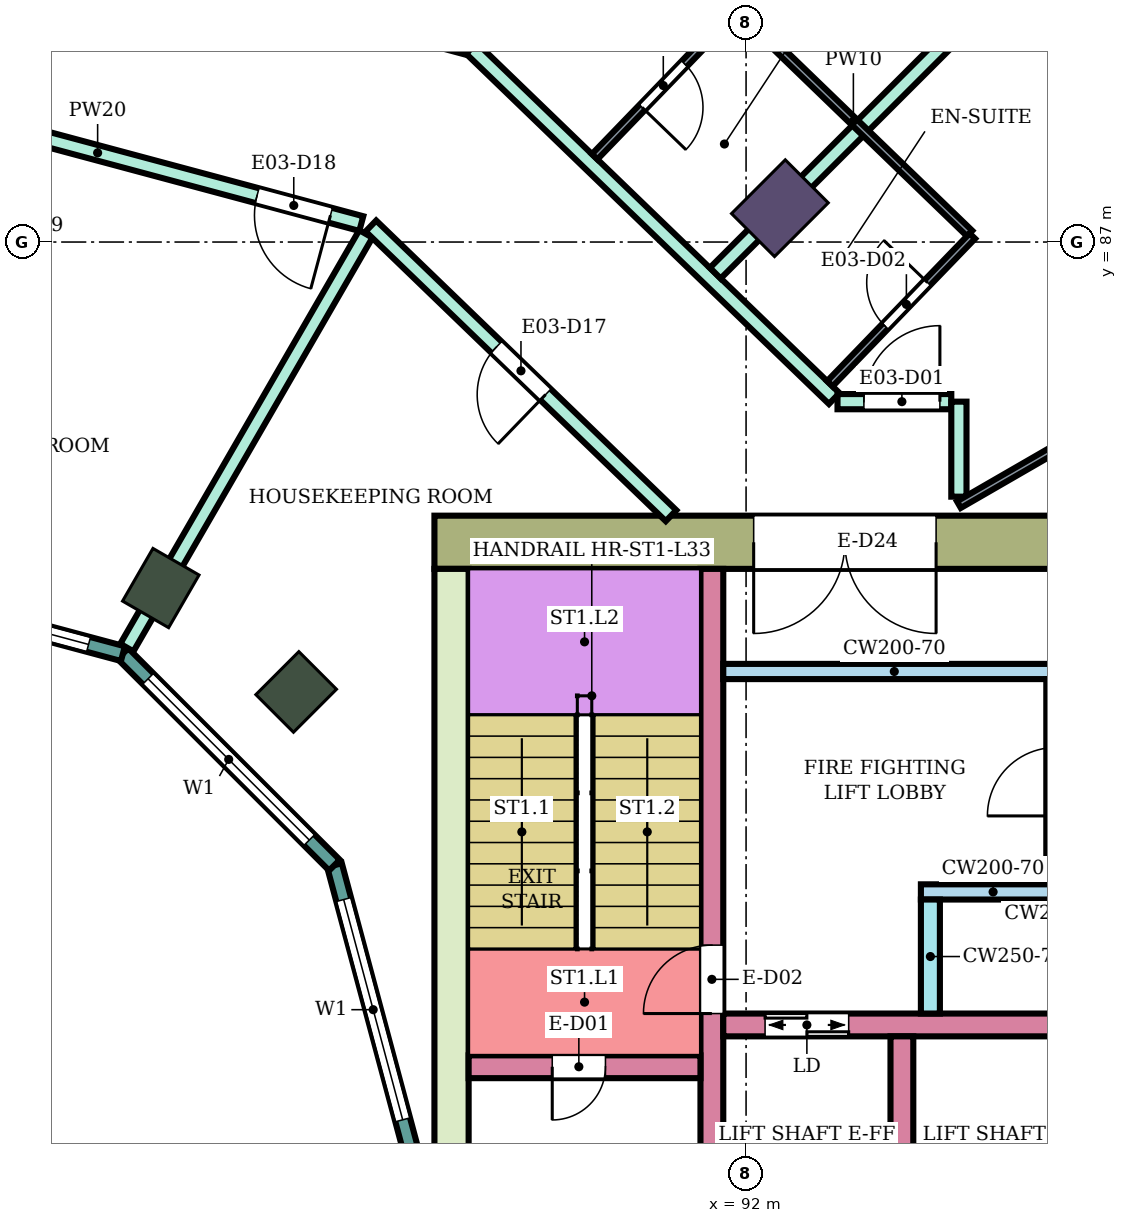
"""IFC4 building model, lengths in metres.
Left out: names, types, materials, properties, quantities, classifications, styles, units other than length and angle.
Written with IfcOpenShell. Run it as: python <this file> out.ifc"""

import sys

from ifc_helpers import new_model, si_unit, direction, frame, frame_2d, origin, origin_2d, place, context, subcontext, project, spatial, rectangle, extrude, element, fill, save


model = new_model("IFC4")
c1 = context("Model", 3, precision=1e-05, world=origin(), true_north=direction((0.0, 1.0)))
c2 = subcontext(c1, "Body", "Model", "MODEL_VIEW")
j1 = project(units=[si_unit("LENGTHUNIT", "METRE"), si_unit("PLANEANGLEUNIT", "RADIAN")], contexts=[c1])
p1 = place(None, origin())
s1 = spatial("IfcSite", under=j1, at=p1, CompositionType="ELEMENT")
p2 = place(p1, origin())
s2 = spatial("IfcBuilding", under=s1, at=p2, CompositionType="ELEMENT")
p3 = place(p2, frame((0.0, 0.0, 141.9)))
s3 = spatial("IfcBuildingStorey", under=s2, at=p3, CompositionType="ELEMENT", Elevation=141.9)
p4 = place(p3, frame((92.445, 87.445, 0.0), z_axis=(0.0, 0.0, 1.0), x_axis=(0.707106781187, 0.707106781187, 0.0)))
e1 = element("IfcColumn", 1, at=p4, inside=s3, PredefinedType="COLUMN", context=c2, shape_type="SweptSolid", body=[
    extrude(rectangle(XDim=1.0, YDim=0.8, at=origin_2d()), origin(), (0.0, 0.0, 1.0), 3.9),
])
for number, where, z_axis, x_axis in (
    (2, (86.081, 81.081, 0.0), (0.0, 0.0, 1.0), (0.707, 0.707, 0.0)),
    (3, (84.3, 82.448, 0.0), (0.0, 0.0, 1.0), (0.5, 0.866, 0.0)),
):
    element("IfcColumn", number, at=place(p3, frame(where, z_axis=z_axis, x_axis=x_axis)), inside=s3, PredefinedType="COLUMN", context=c2, shape_type="SweptSolid", body=[
        extrude(rectangle(XDim=0.8, YDim=0.7, at=origin_2d()), origin(), (0.0, 0.0, 1.0), 3.9),
    ])
p5 = place(p3, frame((95.91, 90.91, 0.0), z_axis=(0.0, 0.0, 1.0), x_axis=(0.707106781187, 0.707106781187, 0.0)))
e4 = element("IfcColumn", 4, at=p5, inside=s3, PredefinedType="COLUMN", context=c2, shape_type="SweptSolid", body=[
    extrude(rectangle(XDim=1.8, YDim=2.4, at=origin_2d()), origin(), (0.0, 0.0, 1.0), 3.9),
])
p6 = place(p3, frame((87.9, 83.05, 0.0), z_axis=(0.0, 0.0, 1.0), x_axis=(1.0, 0.0, 0.0)))
e5 = element("IfcWall", 5, at=p6, inside=s3, PredefinedType="SHEAR", context=c2, shape_type="SweptSolid", body=[
    extrude(rectangle(XDim=14.8, YDim=0.7, at=frame_2d((7.4, 0.0))), origin(), (0.0, 0.0, 1.0), 3.58),
])
p7 = place(p6, frame((4.2, 0.0, 0.0)))
e6 = element("IfcOpeningElement", 6, at=p7, cuts=e5, PredefinedType="OPENING", context=c2, shape_type="SweptSolid", body=[
    extrude(rectangle(XDim=2.4, YDim=2.4, at=frame_2d((1.2, 1.2))), frame((0.0, 0.36, 0.0), z_axis=(0.0, -1.0, 0.0), x_axis=(1.0, 0.0, 0.0)), (0.0, 0.0, 1.0), 0.72),
])
p8 = place(p3, frame((88.125, 75.0, 0.0), z_axis=(0.0, 0.0, 1.0), x_axis=(0.0, 1.0, 0.0)))
e7 = element("IfcWall", 7, at=p8, inside=s3, PredefinedType="SHEAR", context=c2, shape_type="SweptSolid", body=[
    extrude(rectangle(XDim=7.7, YDim=0.45, at=frame_2d((3.85, 0.0))), origin(), (0.0, 0.0, 1.0), 3.58),
])
p9 = place(p3, frame((91.55, 75.0, 0.0), z_axis=(0.0, 0.0, 1.0), x_axis=(0.0, 1.0, 0.0)))
e8 = element("IfcWall", 8, at=p9, inside=s3, PredefinedType="SHEAR", context=c2, shape_type="SweptSolid", body=[
    extrude(rectangle(XDim=7.7, YDim=0.3, at=frame_2d((3.85, 0.0))), origin(), (0.0, 0.0, 1.0), 3.58),
])
p10 = place(p9, frame((1.85, 0.0, 0.0)))
e9 = element("IfcOpeningElement", 9, at=p10, cuts=e8, PredefinedType="OPENING", context=c2, shape_type="SweptSolid", body=[
    extrude(rectangle(XDim=0.9, YDim=2.1, at=frame_2d((0.45, 1.05))), frame((0.0, 0.16, 0.0), z_axis=(0.0, -1.0, 0.0), x_axis=(1.0, 0.0, 0.0)), (0.0, 0.0, 1.0), 0.32),
])
p11 = place(p3, frame((88.35, 76.15, 0.0), z_axis=(0.0, 0.0, 1.0), x_axis=(1.0, 0.0, 0.0)))
e10 = element("IfcWall", 10, at=p11, inside=s3, PredefinedType="SHEAR", context=c2, shape_type="SweptSolid", body=[
    extrude(rectangle(XDim=3.05, YDim=0.3, at=frame_2d((1.525, 0.0))), origin(), (0.0, 0.0, 1.0), 3.58),
])
p12 = place(p11, frame((1.1, 0.0, 0.0)))
e11 = element("IfcOpeningElement", 11, at=p12, cuts=e10, PredefinedType="OPENING", context=c2, shape_type="SweptSolid", body=[
    extrude(rectangle(XDim=0.7, YDim=2.0, at=frame_2d((0.35, 1.0))), frame((0.0, 0.16, 0.0), z_axis=(0.0, -1.0, 0.0), x_axis=(1.0, 0.0, 0.0)), (0.0, 0.0, 1.0), 0.32),
])
p13 = place(p3, frame((91.7, 76.7, 0.0), z_axis=(0.0, 0.0, 1.0), x_axis=(1.0, 0.0, 0.0)))
e12 = element("IfcWall", 12, at=p13, inside=s3, PredefinedType="SHEAR", context=c2, shape_type="SweptSolid", body=[
    extrude(rectangle(XDim=11.0, YDim=0.3, at=frame_2d((5.5, 0.0))), origin(), (0.0, 0.0, 1.0), 3.58),
])
p14 = place(p13, frame((0.55, 0.0, 0.0)))
e13 = element("IfcOpeningElement", 13, at=p14, cuts=e12, PredefinedType="OPENING", context=c2, shape_type="SweptSolid", body=[
    extrude(rectangle(XDim=1.1, YDim=2.1, at=frame_2d((0.55, 1.05))), frame((0.0, 0.16, 0.0), z_axis=(0.0, -1.0, 0.0), x_axis=(1.0, 0.0, 0.0)), (0.0, 0.0, 1.0), 0.32),
])
p15 = place(p13, frame((8.1, 0.0, 0.0)))
e14 = element("IfcOpeningElement", 14, at=p15, cuts=e12, PredefinedType="OPENING", context=c2, shape_type="SweptSolid", body=[
    extrude(rectangle(XDim=1.0, YDim=2.1, at=frame_2d((0.5, 1.05))), frame((0.0, 0.16, 0.0), z_axis=(0.0, -1.0, 0.0), x_axis=(1.0, 0.0, 0.0)), (0.0, 0.0, 1.0), 0.32),
])
p16 = place(p3, frame((94.05, 74.0, 0.0), z_axis=(0.0, 0.0, 1.0), x_axis=(0.0, 1.0, 0.0)))
e15 = element("IfcWall", 15, at=p16, inside=s3, PredefinedType="SHEAR", context=c2, shape_type="SweptSolid", body=[
    extrude(rectangle(XDim=2.55, YDim=0.3, at=frame_2d((1.275, 0.0))), origin(), (0.0, 0.0, 1.0), 3.58),
])
p17 = place(p3, frame((91.7, 81.35, 0.0), z_axis=(0.0, 0.0, 1.0), x_axis=(1.0, 0.0, 0.0)))
e16 = element("IfcWall", 16, at=p17, inside=s3, PredefinedType="SHEAR", context=c2, shape_type="SweptSolid", body=[
    extrude(rectangle(XDim=4.5, YDim=0.2, at=frame_2d((2.25, 0.0))), origin(), (0.0, 0.0, 1.0), 3.58),
])
p18 = place(p3, frame((96.075, 78.55, 0.0), z_axis=(0.0, 0.0, 1.0), x_axis=(0.0, 1.0, 0.0)))
e17 = element("IfcWall", 17, at=p18, inside=s3, PredefinedType="SHEAR", context=c2, shape_type="SweptSolid", body=[
    extrude(rectangle(XDim=2.7, YDim=0.25, at=frame_2d((1.35, 0.0))), origin(), (0.0, 0.0, 1.0), 3.58),
])
p19 = place(p18, frame((0.9, 0.0, 0.0)))
e18 = element("IfcOpeningElement", 18, at=p19, cuts=e17, PredefinedType="OPENING", context=c2, shape_type="SweptSolid", body=[
    extrude(rectangle(XDim=0.9, YDim=2.1, at=frame_2d((0.45, 1.05))), frame((0.0, 0.135, 0.0), z_axis=(0.0, -1.0, 0.0), x_axis=(1.0, 0.0, 0.0)), (0.0, 0.0, 1.0), 0.27),
])
p20 = place(p3, frame((94.3, 78.45, 0.0), z_axis=(0.0, 0.0, 1.0), x_axis=(1.0, 0.0, 0.0)))
e19 = element("IfcWall", 19, at=p20, inside=s3, PredefinedType="SHEAR", context=c2, shape_type="SweptSolid", body=[
    extrude(rectangle(XDim=1.9, YDim=0.2, at=frame_2d((0.95, 0.0))), origin(), (0.0, 0.0, 1.0), 3.58),
])
p21 = place(p3, frame((94.425, 76.85, 0.0), z_axis=(0.0, 0.0, 1.0), x_axis=(0.0, 1.0, 0.0)))
e20 = element("IfcWall", 20, at=p21, inside=s3, PredefinedType="SHEAR", context=c2, shape_type="SweptSolid", body=[
    extrude(rectangle(XDim=1.5, YDim=0.25, at=frame_2d((0.75, 0.0))), origin(), (0.0, 0.0, 1.0), 3.58),
])
p22 = place(p3, frame((87.604, 75.0, 0.0), z_axis=(0.0, 0.0, 1.0), x_axis=(-0.258789828301, 0.965933654434, 0.0)))
e21 = element("IfcWall", 21, at=p22, inside=s3, PredefinedType="NOTDEFINED", context=c2, shape_type="SweptSolid", body=[
    extrude(rectangle(XDim=3.936, YDim=0.2, at=frame_2d((1.968, 0.0))), origin(), (0.0, 0.0, 1.0), 3.9),
])
p23 = place(p22, frame((0.468, 0.0, 0.9)))
e22 = element("IfcOpeningElement", 22, at=p23, cuts=e21, PredefinedType="OPENING", context=c2, shape_type="SweptSolid", body=[
    extrude(rectangle(XDim=3.0, YDim=2.3, at=frame_2d((1.5, 1.15))), frame((0.0, 0.11, 0.0), z_axis=(0.0, -1.0, 0.0), x_axis=(1.0, 0.0, 0.0)), (0.0, 0.0, 1.0), 0.22),
])
p24 = place(p3, frame((86.585, 78.802, 0.0), z_axis=(0.0, 0.0, 1.0), x_axis=(-0.707106781187, 0.707106781187, 0.0)))
e23 = element("IfcWall", 23, at=p24, inside=s3, PredefinedType="NOTDEFINED", context=c2, shape_type="SweptSolid", body=[
    extrude(rectangle(XDim=3.936, YDim=0.2, at=frame_2d((1.968, 0.0))), origin(), (0.0, 0.0, 1.0), 3.9),
])
p25 = place(p24, frame((0.468, 0.0, 0.9)))
e24 = element("IfcOpeningElement", 24, at=p25, cuts=e23, PredefinedType="OPENING", context=c2, shape_type="SweptSolid", body=[
    extrude(rectangle(XDim=3.0, YDim=2.3, at=frame_2d((1.5, 1.15))), frame((0.0, 0.11, 0.0), z_axis=(0.0, -1.0, 0.0), x_axis=(1.0, 0.0, 0.0)), (0.0, 0.0, 1.0), 0.22),
])
p26 = place(p3, frame((83.802, 81.585, 0.0), z_axis=(0.0, 0.0, 1.0), x_axis=(-0.965933654434, 0.258789828301, 0.0)))
e25 = element("IfcWall", 25, at=p26, inside=s3, PredefinedType="NOTDEFINED", context=c2, shape_type="SweptSolid", body=[
    extrude(rectangle(XDim=3.936, YDim=0.2, at=frame_2d((1.968, 0.0))), origin(), (0.0, 0.0, 1.0), 3.9),
])
p27 = place(p26, frame((0.468, 0.0, 0.9)))
e26 = element("IfcOpeningElement", 26, at=p27, cuts=e25, PredefinedType="OPENING", context=c2, shape_type="SweptSolid", body=[
    extrude(rectangle(XDim=3.0, YDim=2.3, at=frame_2d((1.5, 1.15))), frame((0.0, 0.11, 0.0), z_axis=(0.0, -1.0, 0.0), x_axis=(1.0, 0.0, 0.0)), (0.0, 0.0, 1.0), 0.22),
])
p28 = place(p3, frame((80.0, 89.104, 0.0), z_axis=(0.0, 0.0, 1.0), x_axis=(0.965854247166, -0.25908603442, 0.0)))
e27 = element("IfcWall", 27, at=p28, inside=s3, PredefinedType="PARTITIONING", context=c2, shape_type="SweptSolid", body=[
    extrude(rectangle(XDim=7.183, YDim=0.2, at=frame_2d((3.592, 0.0))), origin(), (0.0, 0.0, 1.0), 3.45),
])
p29 = place(p28, frame((5.763, 0.0, 0.0)))
e28 = element("IfcOpeningElement", 28, at=p29, cuts=e27, PredefinedType="OPENING", context=c2, shape_type="SweptSolid", body=[
    extrude(rectangle(XDim=1.0, YDim=2.1, at=frame_2d((0.5, 1.05))), frame((0.0, 0.11, 0.0), z_axis=(0.0, -1.0, 0.0), x_axis=(1.0, 0.0, 0.0)), (0.0, 0.0, 1.0), 0.22),
])
p30 = place(p3, frame((80.0, 91.796, 0.0), z_axis=(0.0, 0.0, 1.0), x_axis=(0.965891796243, -0.258946013582, 0.0)))
e29 = element("IfcWall", 29, at=p30, inside=s3, PredefinedType="PARTITIONING", context=c2, shape_type="SweptSolid", body=[
    extrude(rectangle(XDim=8.642, YDim=0.2, at=frame_2d((4.321, 0.0))), origin(), (0.0, 0.0, 1.0), 3.45),
])
p31 = place(p30, frame((4.877, 0.0, 0.0)))
e30 = element("IfcOpeningElement", 30, at=p31, cuts=e29, PredefinedType="OPENING", context=c2, shape_type="SweptSolid", body=[
    extrude(rectangle(XDim=1.0, YDim=2.1, at=frame_2d((0.5, 1.05))), frame((0.0, 0.11, 0.0), z_axis=(0.0, -1.0, 0.0), x_axis=(1.0, 0.0, 0.0)), (0.0, 0.0, 1.0), 0.22),
])
p32 = place(p30, frame((2.817, 0.0, 0.0)))
e31 = element("IfcOpeningElement", 31, at=p32, cuts=e29, PredefinedType="OPENING", context=c2, shape_type="SweptSolid", body=[
    extrude(rectangle(XDim=1.0, YDim=2.1, at=frame_2d((0.5, 1.05))), frame((0.0, 0.11, 0.0), z_axis=(0.0, -1.0, 0.0), x_axis=(1.0, 0.0, 0.0)), (0.0, 0.0, 1.0), 0.22),
])
p33 = place(p3, frame((83.854, 81.665, 0.0), z_axis=(0.0, 0.0, 1.0), x_axis=(0.500241355856, 0.865886012066, 0.0)))
e32 = element("IfcWall", 32, at=p33, inside=s3, PredefinedType="PARTITIONING", context=c2, shape_type="SweptSolid", body=[
    extrude(rectangle(XDim=6.285, YDim=0.2, at=frame_2d((3.143, 0.0))), origin(), (0.0, 0.0, 1.0), 3.45),
])
p34 = place(p3, frame((87.064, 87.211, 0.0), z_axis=(0.0, 0.0, 1.0), x_axis=(0.719562412484, -0.694427774891, 0.0)))
e33 = element("IfcWall", 33, at=p34, inside=s3, PredefinedType="PARTITIONING", context=c2, shape_type="SweptSolid", body=[
    extrude(rectangle(XDim=5.488, YDim=0.2, at=frame_2d((2.744, 0.0))), origin(), (0.0, 0.0, 1.0), 3.45),
])
p35 = place(p34, frame((2.294, 0.0, 0.0)))
e34 = element("IfcOpeningElement", 34, at=p35, cuts=e33, PredefinedType="OPENING", context=c2, shape_type="SweptSolid", body=[
    extrude(rectangle(XDim=0.9, YDim=2.1, at=frame_2d((0.45, 1.05))), frame((0.0, 0.11, 0.0), z_axis=(0.0, -1.0, 0.0), x_axis=(1.0, 0.0, 0.0)), (0.0, 0.0, 1.0), 0.22),
])
p36 = place(p3, frame((88.386, 89.549, 0.0), z_axis=(0.0, 0.0, 1.0), x_axis=(0.719507339337, -0.694484836869, 0.0)))
e35 = element("IfcWall", 35, at=p36, inside=s3, PredefinedType="PARTITIONING", context=c2, shape_type="SweptSolid", body=[
    extrude(rectangle(XDim=6.635, YDim=0.2, at=frame_2d((3.317, 0.0))), origin(), (0.0, 0.0, 1.0), 3.45),
])
p37 = place(p3, frame((91.595, 86.591, 0.0), z_axis=(0.0, 0.0, 1.0), x_axis=(0.707214399597, 0.706999146394, 0.0)))
e36 = element("IfcWall", 36, at=p37, inside=s3, PredefinedType="PARTITIONING", context=c2, shape_type="SweptSolid", body=[
    extrude(rectangle(XDim=6.805, YDim=0.2, at=frame_2d((3.403, 0.0))), origin(), (0.0, 0.0, 1.0), 3.45),
])
p38 = place(p3, frame((93.203, 84.9, 0.0), z_axis=(0.0, 0.0, 1.0), x_axis=(1.0, 0.0, 0.0)))
e37 = element("IfcWall", 37, at=p38, inside=s3, PredefinedType="PARTITIONING", context=c2, shape_type="SweptSolid", body=[
    extrude(rectangle(XDim=1.497, YDim=0.2, at=frame_2d((0.749, 0.0))), origin(), (0.0, 0.0, 1.0), 3.45),
])
p39 = place(p38, frame((0.347, 0.0, 0.0)))
e38 = element("IfcOpeningElement", 38, at=p39, cuts=e37, PredefinedType="OPENING", context=c2, shape_type="SweptSolid", body=[
    extrude(rectangle(XDim=1.0, YDim=2.1, at=frame_2d((0.5, 1.05))), frame((0.0, 0.11, 0.0), z_axis=(0.0, -1.0, 0.0), x_axis=(1.0, 0.0, 0.0)), (0.0, 0.0, 1.0), 0.22),
])
p40 = place(p3, frame((94.8, 83.65, 0.0), z_axis=(0.0, 0.0, 1.0), x_axis=(0.0, 1.0, 0.0)))
e39 = element("IfcWall", 39, at=p40, inside=s3, PredefinedType="PARTITIONING", context=c2, shape_type="SweptSolid", body=[
    extrude(rectangle(XDim=1.25, YDim=0.2, at=frame_2d((0.625, 0.0))), origin(), (0.0, 0.0, 1.0), 3.45),
])
p41 = place(p3, frame((90.008, 88.123, 0.0), z_axis=(0.0, 0.0, 1.0), x_axis=(0.694372521817, 0.719615731447, 0.0)))
e40 = element("IfcWall", 40, at=p41, inside=s3, PredefinedType="PARTITIONING", context=c2, shape_type="SweptSolid", body=[
    extrude(rectangle(XDim=2.65, YDim=0.1, at=frame_2d((1.325, 0.0))), origin(), (0.0, 0.0, 1.0), 3.45),
])
p42 = place(p41, frame((0.9, 0.0, 0.0)))
e41 = element("IfcOpeningElement", 41, at=p42, cuts=e40, PredefinedType="OPENING", context=c2, shape_type="SweptSolid", body=[
    extrude(rectangle(XDim=0.8, YDim=2.1, at=frame_2d((0.4, 1.05))), frame((0.0, 0.06, 0.0), z_axis=(0.0, -1.0, 0.0), x_axis=(1.0, 0.0, 0.0)), (0.0, 0.0, 1.0), 0.12),
])
p43 = place(p3, frame((91.883, 90.066, 0.0), z_axis=(0.0, 0.0, 1.0), x_axis=(0.719460839421, -0.694533008963, 0.0)))
e42 = element("IfcWall", 42, at=p43, inside=s3, PredefinedType="PARTITIONING", context=c2, shape_type="SweptSolid", body=[
    extrude(rectangle(XDim=4.25, YDim=0.1, at=frame_2d((2.125, 0.0))), origin(), (0.0, 0.0, 1.0), 3.45),
])
p44 = place(p3, frame((93.103, 85.136, 0.0), z_axis=(0.0, 0.0, 1.0), x_axis=(0.694287838235, 0.719697434815, 0.0)))
e43 = element("IfcWall", 43, at=p44, inside=s3, PredefinedType="PARTITIONING", context=c2, shape_type="SweptSolid", body=[
    extrude(rectangle(XDim=2.7, YDim=0.1, at=frame_2d((1.35, 0.0))), origin(), (0.0, 0.0, 1.0), 3.45),
])
p45 = place(p44, frame((1.05, 0.0, 0.0)))
e44 = element("IfcOpeningElement", 44, at=p45, cuts=e43, PredefinedType="OPENING", context=c2, shape_type="SweptSolid", body=[
    extrude(rectangle(XDim=0.8, YDim=2.1, at=frame_2d((0.4, 1.05))), frame((0.0, 0.06, 0.0), z_axis=(0.0, -1.0, 0.0), x_axis=(1.0, 0.0, 0.0)), (0.0, 0.0, 1.0), 0.12),
])
p46 = place(p3, frame((94.8, 83.545, 0.0), z_axis=(0.0, 0.0, 1.0), x_axis=(0.86602264145, 0.500004784474, 0.0)))
e45 = element("IfcWall", 45, at=p46, inside=s3, PredefinedType="PARTITIONING", context=c2, shape_type="SweptSolid", body=[
    extrude(rectangle(XDim=8.708, YDim=0.1, at=frame_2d((4.354, 0.0))), origin(), (0.0, 0.0, 1.0), 3.45),
])
p47 = place(p46, frame((3.879, 0.0, 0.0)))
e46 = element("IfcOpeningElement", 46, at=p47, cuts=e45, PredefinedType="OPENING", context=c2, shape_type="SweptSolid", body=[
    extrude(rectangle(XDim=0.9, YDim=2.1, at=frame_2d((0.45, 1.05))), frame((0.0, 0.06, 0.0), z_axis=(0.0, -1.0, 0.0), x_axis=(1.0, 0.0, 0.0)), (0.0, 0.0, 1.0), 0.12),
])
p48 = place(p23, origin())
e47 = element("IfcWindow", 47, at=p48, inside=s3, PartitioningType="SINGLE_PANEL", PredefinedType="WINDOW", context=c2, shape_type="SweptSolid", body=[
    extrude(rectangle(XDim=3.0, YDim=2.3, at=frame_2d((1.5, 1.15))), frame((0.0, 0.03, 0.0), z_axis=(0.0, -1.0, 0.0), x_axis=(1.0, 0.0, 0.0)), (0.0, 0.0, 1.0), 0.06),
])
fill(e22, e47)
p49 = place(p25, origin())
e48 = element("IfcWindow", 48, at=p49, inside=s3, PartitioningType="SINGLE_PANEL", PredefinedType="WINDOW", context=c2, shape_type="SweptSolid", body=[
    extrude(rectangle(XDim=3.0, YDim=2.3, at=frame_2d((1.5, 1.15))), frame((0.0, 0.03, 0.0), z_axis=(0.0, -1.0, 0.0), x_axis=(1.0, 0.0, 0.0)), (0.0, 0.0, 1.0), 0.06),
])
fill(e24, e48)
p50 = place(p27, origin())
e49 = element("IfcWindow", 49, at=p50, inside=s3, PartitioningType="SINGLE_PANEL", PredefinedType="WINDOW", context=c2, shape_type="SweptSolid", body=[
    extrude(rectangle(XDim=3.0, YDim=2.3, at=frame_2d((1.5, 1.15))), frame((0.0, 0.03, 0.0), z_axis=(0.0, -1.0, 0.0), x_axis=(1.0, 0.0, 0.0)), (0.0, 0.0, 1.0), 0.06),
])
fill(e26, e49)
p51 = place(p39, origin())
e50 = element("IfcDoor", 50, at=p51, inside=s3, OperationType="SINGLE_SWING_RIGHT", PredefinedType="DOOR", context=c2, shape_type="SweptSolid", body=[
    extrude(rectangle(XDim=1.0, YDim=2.1, at=frame_2d((0.5, 1.05))), frame((0.0, 0.025, 0.0), z_axis=(0.0, -1.0, 0.0), x_axis=(1.0, 0.0, 0.0)), (0.0, 0.0, 1.0), 0.05),
])
fill(e38, e50)
p52 = place(p45, origin())
e51 = element("IfcDoor", 51, at=p52, inside=s3, OperationType="SINGLE_SWING_RIGHT", PredefinedType="DOOR", context=c2, shape_type="SweptSolid", body=[
    extrude(rectangle(XDim=0.8, YDim=2.1, at=frame_2d((0.4, 1.05))), frame((0.0, 0.025, 0.0), z_axis=(0.0, -1.0, 0.0), x_axis=(1.0, 0.0, 0.0)), (0.0, 0.0, 1.0), 0.05),
])
fill(e44, e51)
p53 = place(p42, frame((0.8, 0.0, 0.0), z_axis=(0.0, 0.0, 1.0), x_axis=(-1.0, 0.0, 0.0)))
e52 = element("IfcDoor", 52, at=p53, inside=s3, OperationType="SINGLE_SWING_RIGHT", PredefinedType="DOOR", context=c2, shape_type="SweptSolid", body=[
    extrude(rectangle(XDim=0.8, YDim=2.1, at=frame_2d((0.4, 1.05))), frame((0.0, 0.025, 0.0), z_axis=(0.0, -1.0, 0.0), x_axis=(1.0, 0.0, 0.0)), (0.0, 0.0, 1.0), 0.05),
])
fill(e41, e52)
p54 = place(p35, frame((0.9, 0.0, 0.0), z_axis=(0.0, 0.0, 1.0), x_axis=(-1.0, 0.0, 0.0)))
e53 = element("IfcDoor", 53, at=p54, inside=s3, OperationType="SINGLE_SWING_LEFT", PredefinedType="DOOR", context=c2, shape_type="SweptSolid", body=[
    extrude(rectangle(XDim=0.9, YDim=2.1, at=frame_2d((0.45, 1.05))), frame((0.0, 0.025, 0.0), z_axis=(0.0, -1.0, 0.0), x_axis=(1.0, 0.0, 0.0)), (0.0, 0.0, 1.0), 0.05),
])
fill(e34, e53)
p55 = place(p29, frame((1.0, 0.0, 0.0), z_axis=(0.0, 0.0, 1.0), x_axis=(-1.0, 0.0, 0.0)))
e54 = element("IfcDoor", 54, at=p55, inside=s3, OperationType="SINGLE_SWING_LEFT", PredefinedType="DOOR", context=c2, shape_type="SweptSolid", body=[
    extrude(rectangle(XDim=1.0, YDim=2.1, at=frame_2d((0.5, 1.05))), frame((0.0, 0.025, 0.0), z_axis=(0.0, -1.0, 0.0), x_axis=(1.0, 0.0, 0.0)), (0.0, 0.0, 1.0), 0.05),
])
fill(e28, e54)
p56 = place(p12, frame((0.7, 0.0, 0.0), z_axis=(0.0, 0.0, 1.0), x_axis=(-1.0, 0.0, 0.0)))
e55 = element("IfcDoor", 55, at=p56, inside=s3, OperationType="SINGLE_SWING_RIGHT", PredefinedType="DOOR", context=c2, shape_type="SweptSolid", body=[
    extrude(rectangle(XDim=0.7, YDim=2.0, at=frame_2d((0.35, 1.0))), frame((0.0, 0.025, 0.0), z_axis=(0.0, -1.0, 0.0), x_axis=(1.0, 0.0, 0.0)), (0.0, 0.0, 1.0), 0.05),
])
fill(e11, e55)
p57 = place(p10, origin())
e56 = element("IfcDoor", 56, at=p57, inside=s3, OperationType="SINGLE_SWING_LEFT", PredefinedType="DOOR", context=c2, shape_type="SweptSolid", body=[
    extrude(rectangle(XDim=0.9, YDim=2.1, at=frame_2d((0.45, 1.05))), frame((0.0, 0.025, 0.0), z_axis=(0.0, -1.0, 0.0), x_axis=(1.0, 0.0, 0.0)), (0.0, 0.0, 1.0), 0.05),
])
fill(e9, e56)
p58 = place(p14, origin())
e57 = element("IfcDoor", 57, at=p58, inside=s3, OperationType="DOUBLE_DOOR_SLIDING", PredefinedType="DOOR", context=c2, shape_type="SweptSolid", body=[
    extrude(rectangle(XDim=1.1, YDim=2.1, at=frame_2d((0.55, 1.05))), frame((0.0, 0.025, 0.0), z_axis=(0.0, -1.0, 0.0), x_axis=(1.0, 0.0, 0.0)), (0.0, 0.0, 1.0), 0.05),
])
fill(e13, e57)
p59 = place(p7, frame((2.4, 0.0, 0.0), z_axis=(0.0, 0.0, 1.0), x_axis=(-1.0, 0.0, 0.0)))
e58 = element("IfcDoor", 58, at=p59, inside=s3, OperationType="DOUBLE_DOOR_SINGLE_SWING", PredefinedType="DOOR", context=c2, shape_type="SweptSolid", body=[
    extrude(rectangle(XDim=2.4, YDim=2.4, at=frame_2d((1.2, 1.2))), frame((0.0, 0.025, 0.0), z_axis=(0.0, -1.0, 0.0), x_axis=(1.0, 0.0, 0.0)), (0.0, 0.0, 1.0), 0.05),
])
fill(e6, e58)
save(model, sys.argv[1])
